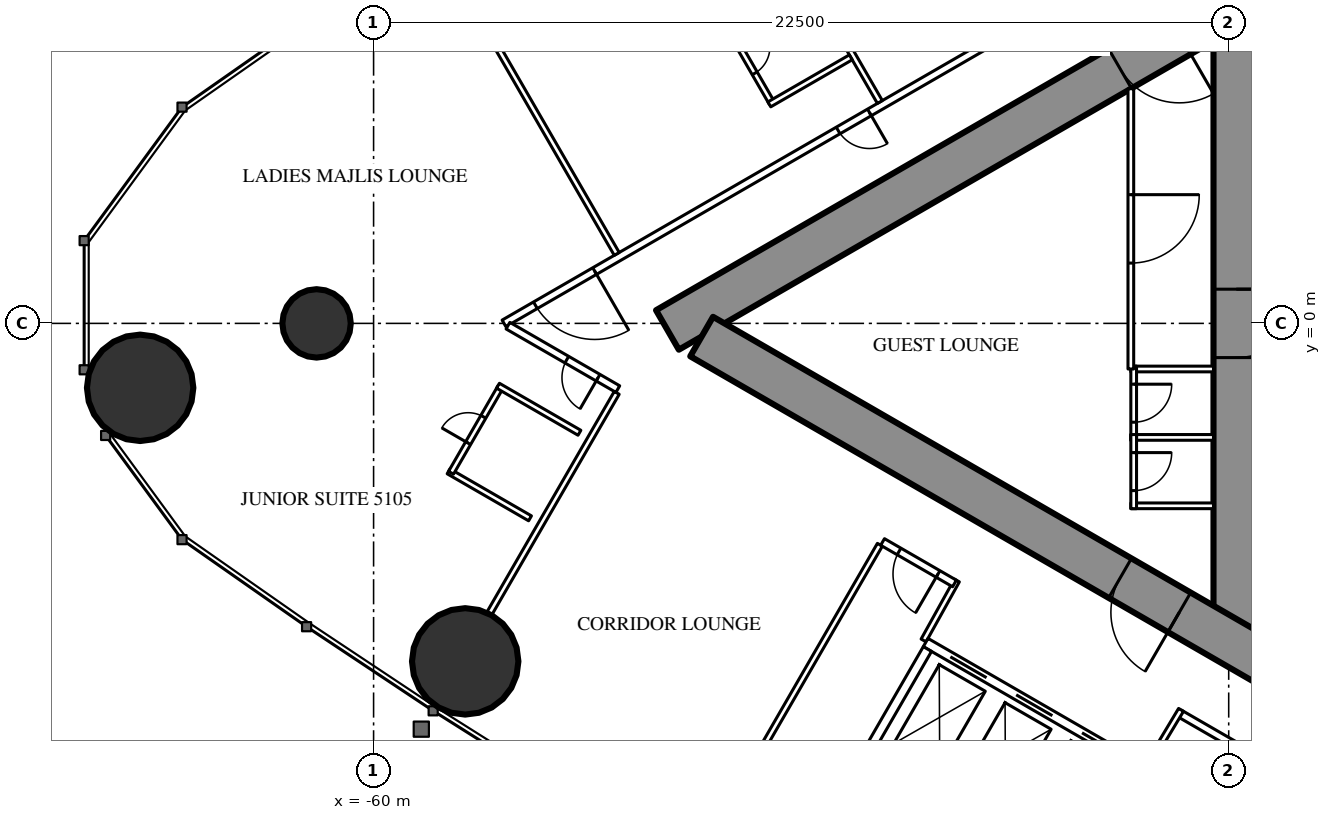
"""IFC4 building model, lengths in metres.
Left out: names, types, materials, properties, quantities, classifications, styles, units other than length and angle.
Written with IfcOpenShell. Run it as: python <this file> out.ifc"""

import sys

from ifc_helpers import new_model, si_unit, direction, frame, frame_2d, origin, origin_2d, place, context, subcontext, project, spatial, rectangle, circle, extrude, element, fill, save


model = new_model("IFC4")
c1 = context("Model", 3, precision=1e-05, world=origin(), true_north=direction((0.0, 1.0)))
c2 = subcontext(c1, "Body", "Model", "MODEL_VIEW")
j1 = project(units=[si_unit("LENGTHUNIT", "METRE"), si_unit("PLANEANGLEUNIT", "RADIAN")], contexts=[c1])
p1 = place(None, origin())
s1 = spatial("IfcSite", under=j1, at=p1, CompositionType="ELEMENT")
p2 = place(p1, origin())
s2 = spatial("IfcBuilding", under=s1, at=p2, CompositionType="ELEMENT")
p3 = place(p2, frame((0.0, 0.0, 191.3)))
s3 = spatial("IfcBuildingStorey", under=s2, at=p3, CompositionType="ELEMENT", Elevation=191.3)
for number, where, z_axis, x_axis in (
    (1, (-66.143, -1.695, 0.0), (0.0, 0.0, 1.0), (1.0, 0.0, 0.0)),
    (2, (-57.59, -8.893, 0.0), (0.0, 0.0, 1.0), (1.0, 0.0, 0.0)),
):
    element("IfcColumn", number, at=place(p3, frame(where, z_axis=z_axis, x_axis=x_axis)), inside=s3, PredefinedType="COLUMN", context=c2, shape_type="SweptSolid", body=[
        extrude(circle(Radius=1.4, at=origin_2d()), origin(), (0.0, 0.0, 1.0), 3.5),
    ])
p4 = place(p3, frame((-61.5, 0.0, 0.0), z_axis=(0.0, 0.0, 1.0), x_axis=(1.0, 0.0, 0.0)))
e3 = element("IfcColumn", 3, at=p4, inside=s3, PredefinedType="COLUMN", context=c2, shape_type="SweptSolid", body=[
    extrude(circle(Radius=0.9, at=origin_2d()), origin(), (0.0, 0.0, 1.0), 3.5),
])
p5 = place(p3, frame((-37.3, 8.6, 0.0), z_axis=(0.0, 0.0, 1.0), x_axis=(0.0, -1.0, 0.0)))
e4 = element("IfcWall", 4, at=p5, inside=s3, PredefinedType="SHEAR", context=c2, shape_type="SweptSolid", body=[
    extrude(rectangle(XDim=17.2, YDim=1.2, at=frame_2d((8.6, 0.0))), origin(), (0.0, 0.0, 1.0), 3.5),
])
p6 = place(p5, frame((7.7, 0.0, 0.0)))
e5 = element("IfcOpeningElement", 5, at=p6, cuts=e4, PredefinedType="OPENING", context=c2, shape_type="SweptSolid", body=[
    extrude(rectangle(XDim=1.8, YDim=2.2, at=frame_2d((0.9, 1.1))), frame((0.0, 0.61, 0.0), z_axis=(0.0, -1.0, 0.0), x_axis=(1.0, 0.0, 0.0)), (0.0, 0.0, 1.0), 1.22),
])
p7 = place(p3, frame((-27.2, 14.3, 0.0), z_axis=(0.0, 0.0, 1.0), x_axis=(-0.866026593062, -0.499997940104, 0.0)))
e6 = element("IfcWall", 6, at=p7, inside=s3, PredefinedType="SHEAR", context=c2, shape_type="SweptSolid", body=[
    extrude(rectangle(XDim=28.946, YDim=1.2, at=frame_2d((14.473, 0.0))), origin(), (0.0, 0.0, 1.0), 3.5),
])
p8 = place(p7, frame((4.6, 0.0, 0.0)))
e7 = element("IfcOpeningElement", 7, at=p8, cuts=e6, PredefinedType="OPENING", context=c2, shape_type="SweptSolid", body=[
    extrude(rectangle(XDim=1.0, YDim=2.2, at=frame_2d((0.5, 1.1))), frame((0.0, 0.61, 0.0), z_axis=(0.0, -1.0, 0.0), x_axis=(1.0, 0.0, 0.0)), (0.0, 0.0, 1.0), 1.22),
])
p9 = place(p7, frame((13.395, 0.0, 0.0)))
e8 = element("IfcOpeningElement", 8, at=p9, cuts=e6, PredefinedType="OPENING", context=c2, shape_type="SweptSolid", body=[
    extrude(rectangle(XDim=1.8, YDim=2.2, at=frame_2d((0.9, 1.1))), frame((0.0, 0.61, 0.0), z_axis=(0.0, -1.0, 0.0), x_axis=(1.0, 0.0, 0.0)), (0.0, 0.0, 1.0), 1.22),
])
p10 = place(p3, frame((-27.2, -14.3, 0.0), z_axis=(0.0, 0.0, 1.0), x_axis=(-0.866024021859, 0.500002393557, 0.0)))
e9 = element("IfcWall", 9, at=p10, inside=s3, PredefinedType="SHEAR", context=c2, shape_type="SweptSolid", body=[
    extrude(rectangle(XDim=27.907, YDim=1.2, at=frame_2d((13.954, 0.0))), origin(), (0.0, 0.0, 1.0), 3.5),
])
p11 = place(p10, frame((4.6, 0.0, 0.0)))
e10 = element("IfcOpeningElement", 10, at=p11, cuts=e9, PredefinedType="OPENING", context=c2, shape_type="SweptSolid", body=[
    extrude(rectangle(XDim=1.0, YDim=2.2, at=frame_2d((0.5, 1.1))), frame((0.0, 0.61, 0.0), z_axis=(0.0, -1.0, 0.0), x_axis=(1.0, 0.0, 0.0)), (0.0, 0.0, 1.0), 1.22),
])
p12 = place(p10, frame((13.395, 0.0, 0.0)))
e11 = element("IfcOpeningElement", 11, at=p12, cuts=e9, PredefinedType="OPENING", context=c2, shape_type="SweptSolid", body=[
    extrude(rectangle(XDim=1.8, YDim=2.2, at=frame_2d((0.9, 1.1))), frame((0.0, 0.61, 0.0), z_axis=(0.0, -1.0, 0.0), x_axis=(1.0, 0.0, 0.0)), (0.0, 0.0, 1.0), 1.22),
])
p13 = place(p3, frame((-27.86, 16.575, 0.0), z_axis=(0.0, 0.0, 1.0), x_axis=(-0.866025533911, -0.499999774615, 0.0)))
e12 = element("IfcWall", 12, at=p13, inside=s3, PredefinedType="PARTITIONING", context=c2, shape_type="SweptSolid", body=[
    extrude(rectangle(XDim=33.149, YDim=0.2, at=frame_2d((16.575, 0.0))), origin(), (0.0, 0.0, 1.0), 3.25),
])
p14 = place(p13, frame((3.75, 0.0, 0.0)))
e13 = element("IfcOpeningElement", 13, at=p14, cuts=e12, PredefinedType="OPENING", context=c2, shape_type="SweptSolid", body=[
    extrude(rectangle(XDim=1.0, YDim=2.2, at=frame_2d((0.5, 1.1))), frame((0.0, 0.11, 0.0), z_axis=(0.0, -1.0, 0.0), x_axis=(1.0, 0.0, 0.0)), (0.0, 0.0, 1.0), 0.22),
])
p15 = place(p13, frame((16.402, 0.0, 0.0)))
e14 = element("IfcOpeningElement", 14, at=p15, cuts=e12, PredefinedType="OPENING", context=c2, shape_type="SweptSolid", body=[
    extrude(rectangle(XDim=0.95, YDim=2.2, at=frame_2d((0.475, 1.1))), frame((0.0, 0.11, 0.0), z_axis=(0.0, -1.0, 0.0), x_axis=(1.0, 0.0, 0.0)), (0.0, 0.0, 1.0), 0.22),
])
p16 = place(p13, frame((22.047, 0.0, 0.0)))
e15 = element("IfcOpeningElement", 15, at=p16, cuts=e12, PredefinedType="OPENING", context=c2, shape_type="SweptSolid", body=[
    extrude(rectangle(XDim=0.95, YDim=2.2, at=frame_2d((0.475, 1.1))), frame((0.0, 0.11, 0.0), z_axis=(0.0, -1.0, 0.0), x_axis=(1.0, 0.0, 0.0)), (0.0, 0.0, 1.0), 0.22),
])
p17 = place(p13, frame((30.396, 0.0, 0.0)))
e16 = element("IfcOpeningElement", 16, at=p17, cuts=e12, PredefinedType="OPENING", context=c2, shape_type="SweptSolid", body=[
    extrude(rectangle(XDim=1.8, YDim=2.2, at=frame_2d((0.9, 1.1))), frame((0.0, 0.11, 0.0), z_axis=(0.0, -1.0, 0.0), x_axis=(1.0, 0.0, 0.0)), (0.0, 0.0, 1.0), 0.22),
])
p18 = place(p3, frame((-46.679, 5.825, 0.0), z_axis=(0.0, 0.0, 1.0), x_axis=(-0.500006839597, 0.866021454905, 0.0)))
e17 = element("IfcWall", 17, at=p18, inside=s3, PredefinedType="PARTITIONING", context=c2, shape_type="SweptSolid", body=[
    extrude(rectangle(XDim=6.911, YDim=0.15, at=frame_2d((3.456, 0.0))), origin(), (0.0, 0.0, 1.0), 2.3),
])
p19 = place(p3, frame((-53.602, 1.828, 0.0), z_axis=(0.0, 0.0, 1.0), x_axis=(-0.49999191814, 0.866030069798, 0.0)))
e18 = element("IfcWall", 18, at=p19, inside=s3, PredefinedType="PARTITIONING", context=c2, shape_type="SweptSolid", body=[
    extrude(rectangle(XDim=6.692, YDim=0.15, at=frame_2d((3.346, 0.0))), origin(), (0.0, 0.0, 1.0), 2.3),
])
p20 = place(p3, frame((-46.679, -5.825, 0.0), z_axis=(0.0, 0.0, 1.0), x_axis=(-0.500006839597, -0.866021454905, 0.0)))
e19 = element("IfcWall", 19, at=p20, inside=s3, PredefinedType="PARTITIONING", context=c2, shape_type="SweptSolid", body=[
    extrude(rectangle(XDim=6.911, YDim=0.15, at=frame_2d((3.456, 0.0))), origin(), (0.0, 0.0, 1.0), 2.3),
])
p21 = place(p3, frame((-53.602, -1.828, 0.0), z_axis=(0.0, 0.0, 1.0), x_axis=(-0.49999191814, -0.866030069798, 0.0)))
e20 = element("IfcWall", 20, at=p21, inside=s3, PredefinedType="PARTITIONING", context=c2, shape_type="SweptSolid", body=[
    extrude(rectangle(XDim=6.692, YDim=0.15, at=frame_2d((3.346, 0.0))), origin(), (0.0, 0.0, 1.0), 2.3),
])
p22 = place(p3, frame((-27.86, -16.575, 0.0), z_axis=(0.0, 0.0, 1.0), x_axis=(-0.866027756871, 0.499995924312, 0.0)))
e21 = element("IfcWall", 21, at=p22, inside=s3, PredefinedType="PARTITIONING", context=c2, shape_type="SweptSolid", body=[
    extrude(rectangle(XDim=12.622, YDim=0.2, at=frame_2d((6.311, 0.0))), origin(), (0.0, 0.0, 1.0), 3.25),
])
p23 = place(p22, frame((8.722, 0.0, 0.0)))
e22 = element("IfcOpeningElement", 22, at=p23, cuts=e21, PredefinedType="OPENING", context=c2, shape_type="SweptSolid", body=[
    extrude(rectangle(XDim=0.95, YDim=2.2, at=frame_2d((0.475, 1.1))), frame((0.0, 0.11, 0.0), z_axis=(0.0, -1.0, 0.0), x_axis=(1.0, 0.0, 0.0)), (0.0, 0.0, 1.0), 0.22),
])
for number, where, z_axis, x_axis in (
    (23, (-39.683, -11.718, 0.0), (0.0, 0.0, 1.0), (0.514, 0.858, 0.0)),
    (24, (-44.652, -6.764, 0.0), (0.0, 0.0, 1.0), (-0.485, -0.874, 0.0)),
):
    element("IfcWall", number, at=place(p3, frame(where, z_axis=z_axis, x_axis=x_axis)), inside=s3, PredefinedType="PARTITIONING", context=c2, shape_type="SweptSolid", body=[
        extrude(rectangle(XDim=1.805, YDim=0.15, at=frame_2d((0.903, 0.0))), origin(), (0.0, 0.0, 1.0), 3.25),
    ])
p24 = place(p3, frame((-44.715, -6.844, 0.0), z_axis=(0.0, 0.0, 1.0), x_axis=(-0.865999496279, 0.500044870432, 0.0)))
e25 = element("IfcWall", 25, at=p24, inside=s3, PredefinedType="PARTITIONING", context=c2, shape_type="SweptSolid", body=[
    extrude(rectangle(XDim=2.185, YDim=0.2, at=frame_2d((1.092, 0.0))), origin(), (0.0, 0.0, 1.0), 3.25),
])
p25 = place(p24, frame((0.5, 0.0, 0.0)))
e26 = element("IfcOpeningElement", 26, at=p25, cuts=e25, PredefinedType="OPENING", context=c2, shape_type="SweptSolid", body=[
    extrude(rectangle(XDim=1.185, YDim=2.2, at=frame_2d((0.593, 1.1))), frame((0.0, 0.11, 0.0), z_axis=(0.0, -1.0, 0.0), x_axis=(1.0, 0.0, 0.0)), (0.0, 0.0, 1.0), 0.22),
])
p26 = place(p3, frame((-53.574, -1.729, 0.0), z_axis=(0.0, 0.0, 1.0), x_axis=(-0.866019930389, 0.500009480079, 0.0)))
e27 = element("IfcWall", 27, at=p26, inside=s3, PredefinedType="PARTITIONING", context=c2, shape_type="SweptSolid", body=[
    extrude(rectangle(XDim=3.338, YDim=0.2, at=frame_2d((1.669, 0.0))), origin(), (0.0, 0.0, 1.0), 3.25),
])
p27 = place(p26, frame((0.6, 0.0, 0.0)))
e28 = element("IfcOpeningElement", 28, at=p27, cuts=e27, PredefinedType="OPENING", context=c2, shape_type="SweptSolid", body=[
    extrude(rectangle(XDim=0.95, YDim=2.2, at=frame_2d((0.475, 1.1))), frame((0.0, 0.11, 0.0), z_axis=(0.0, -1.0, 0.0), x_axis=(1.0, 0.0, 0.0)), (0.0, 0.0, 1.0), 0.22),
])
p28 = place(p3, frame((-49.522, 5.8, 0.0), z_axis=(0.0, 0.0, 1.0), x_axis=(-0.500006934395, 0.866021400173, 0.0)))
e29 = element("IfcWall", 29, at=p28, inside=s3, PredefinedType="PARTITIONING", context=c2, shape_type="SweptSolid", body=[
    extrude(rectangle(XDim=2.6, YDim=0.15, at=frame_2d((1.3, 0.0))), origin(), (0.0, 0.0, 1.0), 3.25),
])
p29 = place(p28, frame((0.9, 0.0, 0.0)))
e30 = element("IfcOpeningElement", 30, at=p29, cuts=e29, PredefinedType="OPENING", context=c2, shape_type="SweptSolid", body=[
    extrude(rectangle(XDim=0.8, YDim=2.2, at=frame_2d((0.4, 1.1))), frame((0.0, 0.085, 0.0), z_axis=(0.0, -1.0, 0.0), x_axis=(1.0, 0.0, 0.0)), (0.0, 0.0, 1.0), 0.17),
])
for number, where, z_axis, x_axis in (
    (31, (-47.444, 7.0, 0.0), (0.0, 0.0, 1.0), (-0.866, -0.5, 0.0)),
    (32, (-55.884, -5.13, 0.0), (0.0, 0.0, 1.0), (-0.866, 0.5, 0.0)),
):
    element("IfcWall", number, at=place(p3, frame(where, z_axis=z_axis, x_axis=x_axis)), inside=s3, PredefinedType="PARTITIONING", context=c2, shape_type="SweptSolid", body=[
        extrude(rectangle(XDim=2.475, YDim=0.15, at=frame_2d((1.237, 0.0))), origin(), (0.0, 0.0, 1.0), 3.25),
    ])
p30 = place(p3, frame((-56.662, -1.678, 0.0), z_axis=(0.0, 0.0, 1.0), x_axis=(-0.500006934395, -0.866021400173, 0.0)))
e33 = element("IfcWall", 33, at=p30, inside=s3, PredefinedType="PARTITIONING", context=c2, shape_type="SweptSolid", body=[
    extrude(rectangle(XDim=2.6, YDim=0.15, at=frame_2d((1.3, 0.0))), origin(), (0.0, 0.0, 1.0), 3.25),
])
p31 = place(p30, frame((0.9, 0.0, 0.0)))
e34 = element("IfcOpeningElement", 34, at=p31, cuts=e33, PredefinedType="OPENING", context=c2, shape_type="SweptSolid", body=[
    extrude(rectangle(XDim=0.8, YDim=2.2, at=frame_2d((0.4, 1.1))), frame((0.0, 0.085, 0.0), z_axis=(0.0, -1.0, 0.0), x_axis=(1.0, 0.0, 0.0)), (0.0, 0.0, 1.0), 0.17),
])
p32 = place(p3, frame((-54.583, -2.878, 0.0), z_axis=(0.0, 0.0, 1.0), x_axis=(-0.866006523861, 0.500032699561, 0.0)))
e35 = element("IfcWall", 35, at=p32, inside=s3, PredefinedType="PARTITIONING", context=c2, shape_type="SweptSolid", body=[
    extrude(rectangle(XDim=2.475, YDim=0.15, at=frame_2d((1.237, 0.0))), origin(), (0.0, 0.0, 1.0), 3.25),
])
for number, where, z_axis, x_axis in (
    (36, (-37.9, -1.2, 0.0), (0.0, 0.0, 1.0), (-1.0, 0.0, 0.0)),
    (37, (-37.9, -3.0, 0.0), (0.0, 0.0, 1.0), (-1.0, 0.0, 0.0)),
    (38, (-37.9, -4.8, 0.0), (0.0, 0.0, 1.0), (-1.0, 0.0, 0.0)),
):
    element("IfcWall", number, at=place(p3, frame(where, z_axis=z_axis, x_axis=x_axis)), inside=s3, PredefinedType="PARTITIONING", context=c2, shape_type="SweptSolid", body=[
        extrude(rectangle(XDim=2.175, YDim=0.15, at=frame_2d((1.087, 0.0))), origin(), (0.0, 0.0, 1.0), 3.25),
    ])
p33 = place(p3, frame((-40.0, -1.125, 0.0), z_axis=(0.0, 0.0, 1.0), x_axis=(0.0, -1.0, 0.0)))
e39 = element("IfcWall", 39, at=p33, inside=s3, PredefinedType="PARTITIONING", context=c2, shape_type="SweptSolid", body=[
    extrude(rectangle(XDim=1.95, YDim=0.15, at=frame_2d((0.975, 0.0))), origin(), (0.0, 0.0, 1.0), 3.25),
])
p34 = place(p33, frame((0.475, 0.0, 0.0)))
e40 = element("IfcOpeningElement", 40, at=p34, cuts=e39, PredefinedType="OPENING", context=c2, shape_type="SweptSolid", body=[
    extrude(rectangle(XDim=1.0, YDim=2.2, at=frame_2d((0.5, 1.1))), frame((0.0, 0.085, 0.0), z_axis=(0.0, -1.0, 0.0), x_axis=(1.0, 0.0, 0.0)), (0.0, 0.0, 1.0), 0.17),
])
p35 = place(p3, frame((-40.0, -2.925, 0.0), z_axis=(0.0, 0.0, 1.0), x_axis=(0.0, -1.0, 0.0)))
e41 = element("IfcWall", 41, at=p35, inside=s3, PredefinedType="PARTITIONING", context=c2, shape_type="SweptSolid", body=[
    extrude(rectangle(XDim=1.95, YDim=0.15, at=frame_2d((0.975, 0.0))), origin(), (0.0, 0.0, 1.0), 3.25),
])
p36 = place(p35, frame((0.475, 0.0, 0.0)))
e42 = element("IfcOpeningElement", 42, at=p36, cuts=e41, PredefinedType="OPENING", context=c2, shape_type="SweptSolid", body=[
    extrude(rectangle(XDim=1.0, YDim=2.2, at=frame_2d((0.5, 1.1))), frame((0.0, 0.085, 0.0), z_axis=(0.0, -1.0, 0.0), x_axis=(1.0, 0.0, 0.0)), (0.0, 0.0, 1.0), 0.17),
])
p37 = place(p3, frame((-40.075, 6.174, 0.0), z_axis=(0.0, 0.0, 1.0), x_axis=(0.0, -1.0, 0.0)))
e43 = element("IfcWall", 43, at=p37, inside=s3, PredefinedType="PARTITIONING", context=c2, shape_type="SweptSolid", body=[
    extrude(rectangle(XDim=7.374, YDim=0.15, at=frame_2d((3.687, 0.0))), origin(), (0.0, 0.0, 1.0), 3.25),
])
p38 = place(p37, frame((2.787, 0.0, 0.0)))
e44 = element("IfcOpeningElement", 44, at=p38, cuts=e43, PredefinedType="OPENING", context=c2, shape_type="SweptSolid", body=[
    extrude(rectangle(XDim=1.8, YDim=2.2, at=frame_2d((0.9, 1.1))), frame((0.0, 0.085, 0.0), z_axis=(0.0, -1.0, 0.0), x_axis=(1.0, 0.0, 0.0)), (0.0, 0.0, 1.0), 0.17),
])
p39 = place(p3, frame((-39.758, -11.697, 0.0), z_axis=(0.0, 0.0, 1.0), x_axis=(-0.866024194504, 0.500002094529, 0.0)))
e45 = element("IfcWall", 45, at=p39, inside=s3, PredefinedType="PARTITIONING", context=c2, shape_type="SweptSolid", body=[
    extrude(rectangle(XDim=6.6, YDim=0.25, at=frame_2d((3.3, 0.0))), origin(), (0.0, 0.0, 1.0), 3.25),
])
p40 = place(p39, frame((0.75, 0.0, 0.0)))
e46 = element("IfcOpeningElement", 46, at=p40, cuts=e45, PredefinedType="OPENING", context=c2, shape_type="SweptSolid", body=[
    extrude(rectangle(XDim=1.1, YDim=2.2, at=frame_2d((0.55, 1.1))), frame((0.0, 0.135, 0.0), z_axis=(0.0, -1.0, 0.0), x_axis=(1.0, 0.0, 0.0)), (0.0, 0.0, 1.0), 0.27),
])
p41 = place(p39, frame((2.75, 0.0, 0.0)))
e47 = element("IfcOpeningElement", 47, at=p41, cuts=e45, PredefinedType="OPENING", context=c2, shape_type="SweptSolid", body=[
    extrude(rectangle(XDim=1.1, YDim=2.2, at=frame_2d((0.55, 1.1))), frame((0.0, 0.135, 0.0), z_axis=(0.0, -1.0, 0.0), x_axis=(1.0, 0.0, 0.0)), (0.0, 0.0, 1.0), 0.27),
])
p42 = place(p39, frame((4.75, 0.0, 0.0)))
e48 = element("IfcOpeningElement", 48, at=p42, cuts=e45, PredefinedType="OPENING", context=c2, shape_type="SweptSolid", body=[
    extrude(rectangle(XDim=1.1, YDim=2.2, at=frame_2d((0.55, 1.1))), frame((0.0, 0.135, 0.0), z_axis=(0.0, -1.0, 0.0), x_axis=(1.0, 0.0, 0.0)), (0.0, 0.0, 1.0), 0.27),
])
p43 = place(p3, frame((-45.428, -8.568, 0.0), z_axis=(0.0, 0.0, 1.0), x_axis=(-0.499929347863, -0.866066190972, 0.0)))
e49 = element("IfcWall", 49, at=p43, inside=s3, PredefinedType="PARTITIONING", context=c2, shape_type="SweptSolid", body=[
    extrude(rectangle(XDim=3.201, YDim=0.25, at=frame_2d((1.6, 0.0))), origin(), (0.0, 0.0, 1.0), 3.25),
])
p44 = place(p29, origin())
e50 = element("IfcDoor", 50, at=p44, inside=s3, OperationType="SINGLE_SWING_RIGHT", PredefinedType="DOOR", context=c2, shape_type="SweptSolid", body=[
    extrude(rectangle(XDim=0.8, YDim=2.2, at=frame_2d((0.4, 1.1))), frame((0.0, 0.025, 0.0), z_axis=(0.0, -1.0, 0.0), x_axis=(1.0, 0.0, 0.0)), (0.0, 0.0, 1.0), 0.05),
])
fill(e30, e50)
p45 = place(p16, origin())
e51 = element("IfcDoor", 51, at=p45, inside=s3, OperationType="SINGLE_SWING_LEFT", PredefinedType="DOOR", context=c2, shape_type="SweptSolid", body=[
    extrude(rectangle(XDim=0.95, YDim=2.2, at=frame_2d((0.475, 1.1))), frame((0.0, 0.025, 0.0), z_axis=(0.0, -1.0, 0.0), x_axis=(1.0, 0.0, 0.0)), (0.0, 0.0, 1.0), 0.05),
])
fill(e15, e51)
p46 = place(p17, origin())
e52 = element("IfcDoor", 52, at=p46, inside=s3, OperationType="DOUBLE_DOOR_SINGLE_SWING", PredefinedType="DOOR", context=c2, shape_type="SweptSolid", body=[
    extrude(rectangle(XDim=1.8, YDim=2.2, at=frame_2d((0.9, 1.1))), frame((0.0, 0.025, 0.0), z_axis=(0.0, -1.0, 0.0), x_axis=(1.0, 0.0, 0.0)), (0.0, 0.0, 1.0), 0.05),
])
fill(e16, e52)
p47 = place(p31, origin())
e53 = element("IfcDoor", 53, at=p47, inside=s3, OperationType="SINGLE_SWING_RIGHT", PredefinedType="DOOR", context=c2, shape_type="SweptSolid", body=[
    extrude(rectangle(XDim=0.8, YDim=2.2, at=frame_2d((0.4, 1.1))), frame((0.0, 0.025, 0.0), z_axis=(0.0, -1.0, 0.0), x_axis=(1.0, 0.0, 0.0)), (0.0, 0.0, 1.0), 0.05),
])
fill(e34, e53)
p48 = place(p27, origin())
e54 = element("IfcDoor", 54, at=p48, inside=s3, OperationType="SINGLE_SWING_LEFT", PredefinedType="DOOR", context=c2, shape_type="SweptSolid", body=[
    extrude(rectangle(XDim=0.95, YDim=2.2, at=frame_2d((0.475, 1.1))), frame((0.0, 0.025, 0.0), z_axis=(0.0, -1.0, 0.0), x_axis=(1.0, 0.0, 0.0)), (0.0, 0.0, 1.0), 0.05),
])
fill(e28, e54)
p49 = place(p25, origin())
e55 = element("IfcDoor", 55, at=p49, inside=s3, OperationType="SINGLE_SWING_LEFT", PredefinedType="DOOR", context=c2, shape_type="SweptSolid", body=[
    extrude(rectangle(XDim=1.185, YDim=2.2, at=frame_2d((0.593, 1.1))), frame((0.0, 0.025, 0.0), z_axis=(0.0, -1.0, 0.0), x_axis=(1.0, 0.0, 0.0)), (0.0, 0.0, 1.0), 0.05),
])
fill(e26, e55)
p50 = place(p34, origin())
e56 = element("IfcDoor", 56, at=p50, inside=s3, OperationType="SINGLE_SWING_LEFT", PredefinedType="DOOR", context=c2, shape_type="SweptSolid", body=[
    extrude(rectangle(XDim=1.0, YDim=2.2, at=frame_2d((0.5, 1.1))), frame((0.0, 0.025, 0.0), z_axis=(0.0, -1.0, 0.0), x_axis=(1.0, 0.0, 0.0)), (0.0, 0.0, 1.0), 0.05),
])
fill(e40, e56)
p51 = place(p36, origin())
e57 = element("IfcDoor", 57, at=p51, inside=s3, OperationType="SINGLE_SWING_LEFT", PredefinedType="DOOR", context=c2, shape_type="SweptSolid", body=[
    extrude(rectangle(XDim=1.0, YDim=2.2, at=frame_2d((0.5, 1.1))), frame((0.0, 0.025, 0.0), z_axis=(0.0, -1.0, 0.0), x_axis=(1.0, 0.0, 0.0)), (0.0, 0.0, 1.0), 0.05),
])
fill(e42, e57)
p52 = place(p38, origin())
e58 = element("IfcDoor", 58, at=p52, inside=s3, OperationType="DOUBLE_DOOR_SINGLE_SWING", PredefinedType="DOOR", context=c2, shape_type="SweptSolid", body=[
    extrude(rectangle(XDim=1.8, YDim=2.2, at=frame_2d((0.9, 1.1))), frame((0.0, 0.025, 0.0), z_axis=(0.0, -1.0, 0.0), x_axis=(1.0, 0.0, 0.0)), (0.0, 0.0, 1.0), 0.05),
])
fill(e44, e58)
p53 = place(p9, origin())
e59 = element("IfcDoor", 59, at=p53, inside=s3, OperationType="DOUBLE_DOOR_SINGLE_SWING", PredefinedType="DOOR", context=c2, shape_type="SweptSolid", body=[
    extrude(rectangle(XDim=1.8, YDim=2.2, at=frame_2d((0.9, 1.1))), frame((0.0, 0.025, 0.0), z_axis=(0.0, -1.0, 0.0), x_axis=(1.0, 0.0, 0.0)), (0.0, 0.0, 1.0), 0.05),
])
fill(e8, e59)
p54 = place(p12, origin())
e60 = element("IfcDoor", 60, at=p54, inside=s3, OperationType="DOUBLE_DOOR_SINGLE_SWING", PredefinedType="DOOR", context=c2, shape_type="SweptSolid", body=[
    extrude(rectangle(XDim=1.8, YDim=2.2, at=frame_2d((0.9, 1.1))), frame((0.0, 0.025, 0.0), z_axis=(0.0, -1.0, 0.0), x_axis=(1.0, 0.0, 0.0)), (0.0, 0.0, 1.0), 0.05),
])
fill(e11, e60)
p55 = place(p6, origin())
e61 = element("IfcDoor", 61, at=p55, inside=s3, OperationType="DOUBLE_DOOR_SINGLE_SWING", PredefinedType="DOOR", context=c2, shape_type="SweptSolid", body=[
    extrude(rectangle(XDim=1.8, YDim=2.2, at=frame_2d((0.9, 1.1))), frame((0.0, 0.025, 0.0), z_axis=(0.0, -1.0, 0.0), x_axis=(1.0, 0.0, 0.0)), (0.0, 0.0, 1.0), 0.05),
])
fill(e5, e61)
p56 = place(p40, origin())
e62 = element("IfcDoor", 62, at=p56, inside=s3, OperationType="DOUBLE_DOOR_SLIDING", PredefinedType="USERDEFINED", context=c2, shape_type="SweptSolid", body=[
    extrude(rectangle(XDim=1.1, YDim=2.2, at=frame_2d((0.55, 1.1))), frame((0.0, 0.025, 0.0), z_axis=(0.0, -1.0, 0.0), x_axis=(1.0, 0.0, 0.0)), (0.0, 0.0, 1.0), 0.05),
])
fill(e46, e62)
p57 = place(p41, origin())
e63 = element("IfcDoor", 63, at=p57, inside=s3, OperationType="DOUBLE_DOOR_SLIDING", PredefinedType="USERDEFINED", context=c2, shape_type="SweptSolid", body=[
    extrude(rectangle(XDim=1.1, YDim=2.2, at=frame_2d((0.55, 1.1))), frame((0.0, 0.025, 0.0), z_axis=(0.0, -1.0, 0.0), x_axis=(1.0, 0.0, 0.0)), (0.0, 0.0, 1.0), 0.05),
])
fill(e47, e63)
p58 = place(p42, origin())
e64 = element("IfcDoor", 64, at=p58, inside=s3, OperationType="DOUBLE_DOOR_SLIDING", PredefinedType="USERDEFINED", context=c2, shape_type="SweptSolid", body=[
    extrude(rectangle(XDim=1.1, YDim=2.2, at=frame_2d((0.55, 1.1))), frame((0.0, 0.025, 0.0), z_axis=(0.0, -1.0, 0.0), x_axis=(1.0, 0.0, 0.0)), (0.0, 0.0, 1.0), 0.05),
])
fill(e48, e64)
save(model, sys.argv[1])
